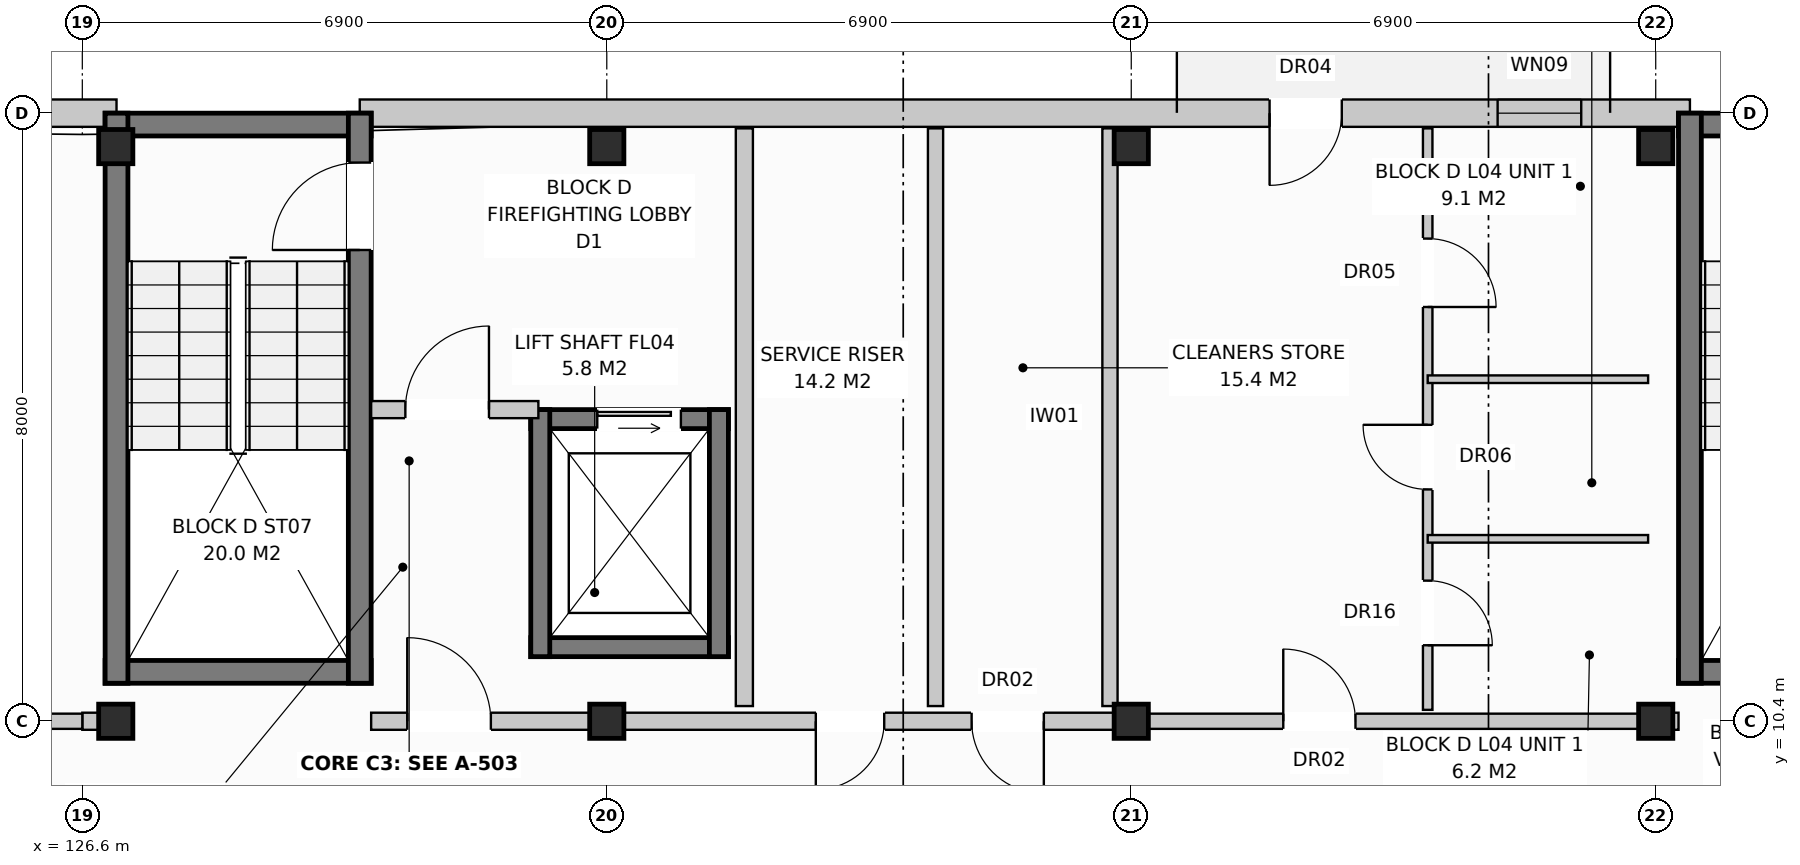
"""IFC4 building model, lengths in metres.
Left out: names, types, materials, properties, quantities, classifications, styles, units other than length and angle.
Written with IfcOpenShell. Run it as: python <this file> out.ifc"""

import sys

from ifc_helpers import new_model, si_unit, direction, frame, frame_2d, origin, origin_with_axes, origin_2d, place, context, subcontext, project, spatial, rectangle, extrude, element, fill, save


model = new_model("IFC4")
c1 = context("Model", 3, precision=1e-05, world=origin(), true_north=direction((0.0, 1.0)))
c2 = subcontext(c1, "Body", "Model", "MODEL_VIEW")
j1 = project(units=[si_unit("LENGTHUNIT", "METRE"), si_unit("PLANEANGLEUNIT", "RADIAN")], contexts=[c1])
p1 = place(None, origin())
s1 = spatial("IfcSite", under=j1, at=p1, CompositionType="ELEMENT")
p2 = place(p1, origin())
s2 = spatial("IfcBuilding", under=s1, at=p2, CompositionType="ELEMENT")
p3 = place(p2, frame((0.0, 0.0, 14.4)))
s3 = spatial("IfcBuildingStorey", under=s2, at=p3, CompositionType="ELEMENT", Elevation=14.4)
for number, where, z_axis, x_axis in (
    (1, (127.04, 10.4, 0.0), (0.0, 0.0, 1.0), (1.0, 0.0, 0.0)),
    (2, (127.04, 17.96, 0.0), (0.0, 0.0, 1.0), (1.0, 0.0, 0.0)),
    (3, (133.5, 10.4, 0.0), (0.0, 0.0, 1.0), (1.0, 0.0, 0.0)),
    (4, (133.5, 17.96, 0.0), (0.0, 0.0, 1.0), (1.0, 0.0, 0.0)),
    (5, (140.4, 10.4, 0.0), (0.0, 0.0, 1.0), (1.0, 0.0, 0.0)),
    (6, (140.4, 17.96, 0.0), (0.0, 0.0, 1.0), (1.0, 0.0, 0.0)),
    (7, (147.3, 10.4, 0.0), (0.0, 0.0, 1.0), (1.0, 0.0, 0.0)),
    (8, (147.3, 17.96, 0.0), (0.0, 0.0, 1.0), (1.0, 0.0, 0.0)),
):
    element("IfcColumn", number, at=place(p3, frame(where, z_axis=z_axis, x_axis=x_axis)), inside=s3, PredefinedType="COLUMN", context=c2, shape_type="SweptSolid", body=[
        extrude(rectangle(XDim=0.45, YDim=0.45, at=origin_2d()), origin(), (0.0, 0.0, 1.0), 3.2),
    ])
p4 = place(p3, frame((112.97, 18.4, 0.0), z_axis=(0.0, 0.0, 1.0), x_axis=(1.0, 0.0, 0.0)))
e9 = element("IfcWall", 9, at=p4, inside=s3, PredefinedType="STANDARD", context=c2, shape_type="SweptSolid", body=[
    extrude(rectangle(XDim=14.08, YDim=0.36, at=frame_2d((7.04, 0.0))), origin(), (0.0, 0.0, 1.0), 2.94),
])
p5 = place(p4, frame((5.127, 0.0, 0.0)))
e10 = element("IfcOpeningElement", 10, at=p5, cuts=e9, PredefinedType="OPENING", context=c2, shape_type="SweptSolid", body=[
    extrude(rectangle(XDim=0.95, YDim=2.1, at=frame_2d((0.475, 1.05))), frame((0.0, 0.192, 0.0), z_axis=(0.0, -1.0, 0.0), x_axis=(1.0, 0.0, 0.0)), (0.0, 0.0, 1.0), 0.384),
])
p6 = place(p4, frame((1.1, 0.0, 0.8)))
e11 = element("IfcOpeningElement", 11, at=p6, cuts=e9, PredefinedType="OPENING", context=c2, shape_type="SweptSolid", body=[
    extrude(rectangle(XDim=1.8, YDim=1.7, at=frame_2d((0.9, 0.85))), frame((0.0, 0.192, 0.0), z_axis=(0.0, -1.0, 0.0), x_axis=(1.0, 0.0, 0.0)), (0.0, 0.0, 1.0), 0.384),
])
p7 = place(p4, frame((10.025, 0.0, 0.8)))
e12 = element("IfcOpeningElement", 12, at=p7, cuts=e9, PredefinedType="OPENING", context=c2, shape_type="SweptSolid", body=[
    extrude(rectangle(XDim=1.95, YDim=1.65, at=frame_2d((0.975, 0.825))), frame((0.0, 0.192, 0.0), z_axis=(0.0, -1.0, 0.0), x_axis=(1.0, 0.0, 0.0)), (0.0, 0.0, 1.0), 0.384),
])
p8 = place(p3, frame((130.25, 18.4, 0.0), z_axis=(0.0, 0.0, 1.0), x_axis=(1.0, 0.0, 0.0)))
e13 = element("IfcWall", 13, at=p8, inside=s3, PredefinedType="STANDARD", context=c2, shape_type="SweptSolid", body=[
    extrude(rectangle(XDim=17.5, YDim=0.36, at=frame_2d((8.75, 0.0))), origin(), (0.0, 0.0, 1.0), 2.94),
])
p9 = place(p8, frame((11.97, 0.0, 0.0)))
e14 = element("IfcOpeningElement", 14, at=p9, cuts=e13, PredefinedType="OPENING", context=c2, shape_type="SweptSolid", body=[
    extrude(rectangle(XDim=0.95, YDim=2.1, at=frame_2d((0.475, 1.05))), frame((0.0, 0.192, 0.0), z_axis=(0.0, -1.0, 0.0), x_axis=(1.0, 0.0, 0.0)), (0.0, 0.0, 1.0), 0.384),
])
p10 = place(p8, frame((14.97, 0.0, 0.72)))
e15 = element("IfcOpeningElement", 15, at=p10, cuts=e13, PredefinedType="OPENING", context=c2, shape_type="SweptSolid", body=[
    extrude(rectangle(XDim=1.1, YDim=1.5, at=frame_2d((0.55, 0.75))), frame((0.0, 0.192, 0.0), z_axis=(0.0, -1.0, 0.0), x_axis=(1.0, 0.0, 0.0)), (0.0, 0.0, 1.0), 0.384),
])
for number, where, z_axis, x_axis in (
    (16, (126.9, 18.25, 0.0), (0.0, 0.0, 1.0), (1.0, 0.0, 0.0)),
    (17, (126.9, 11.05, 0.0), (0.0, 0.0, 1.0), (1.0, 0.0, 0.0)),
):
    element("IfcWall", number, at=place(p3, frame(where, z_axis=z_axis, x_axis=x_axis)), inside=s3, PredefinedType="SHEAR", context=c2, shape_type="SweptSolid", body=[
        extrude(rectangle(XDim=3.5, YDim=0.3, at=frame_2d((1.75, 0.0))), origin(), (0.0, 0.0, 1.0), 2.94),
    ])
p11 = place(p3, frame((127.05, 10.9, 0.0), z_axis=(0.0, 0.0, 1.0), x_axis=(0.0, 1.0, 0.0)))
e18 = element("IfcWall", 18, at=p11, inside=s3, PredefinedType="SHEAR", context=c2, shape_type="SweptSolid", body=[
    extrude(rectangle(XDim=7.5, YDim=0.3, at=frame_2d((3.75, 0.0))), origin(), (0.0, 0.0, 1.0), 2.94),
])
p12 = place(p3, frame((130.25, 10.9, 0.0), z_axis=(0.0, 0.0, 1.0), x_axis=(0.0, 1.0, 0.0)))
e19 = element("IfcWall", 19, at=p12, inside=s3, PredefinedType="SHEAR", context=c2, shape_type="SweptSolid", body=[
    extrude(rectangle(XDim=7.5, YDim=0.3, at=frame_2d((3.75, 0.0))), origin(), (0.0, 0.0, 1.0), 2.94),
])
p13 = place(p12, frame((5.7, 0.0, 0.0)))
e20 = element("IfcOpeningElement", 20, at=p13, cuts=e19, PredefinedType="OPENING", context=c2, shape_type="SweptSolid", body=[
    extrude(rectangle(XDim=1.15, YDim=2.15, at=frame_2d((0.575, 1.075))), frame((0.0, 0.162, 0.0), z_axis=(0.0, -1.0, 0.0), x_axis=(1.0, 0.0, 0.0)), (0.0, 0.0, 1.0), 0.324),
])
p14 = place(p3, frame((132.5, 14.375, 0.0), z_axis=(0.0, 0.0, 1.0), x_axis=(1.0, 0.0, 0.0)))
e21 = element("IfcWall", 21, at=p14, inside=s3, PredefinedType="SHEAR", context=c2, shape_type="SweptSolid", body=[
    extrude(rectangle(XDim=2.6, YDim=0.25, at=frame_2d((1.3, 0.0))), origin(), (0.0, 0.0, 1.0), 2.94),
])
p15 = place(p14, frame((0.875, 0.0, 0.0)))
e22 = element("IfcOpeningElement", 22, at=p15, cuts=e21, PredefinedType="OPENING", context=c2, shape_type="SweptSolid", body=[
    extrude(rectangle(XDim=1.1, YDim=2.1, at=frame_2d((0.55, 1.05))), frame((0.0, 0.137, 0.0), z_axis=(0.0, -1.0, 0.0), x_axis=(1.0, 0.0, 0.0)), (0.0, 0.0, 1.0), 0.274),
])
p16 = place(p3, frame((132.5, 11.375, 0.0), z_axis=(0.0, 0.0, 1.0), x_axis=(1.0, 0.0, 0.0)))
e23 = element("IfcWall", 23, at=p16, inside=s3, PredefinedType="SHEAR", context=c2, shape_type="SweptSolid", body=[
    extrude(rectangle(XDim=2.6, YDim=0.25, at=frame_2d((1.3, 0.0))), origin(), (0.0, 0.0, 1.0), 2.94),
])
for number, where, z_axis, x_axis in (
    (24, (132.625, 11.25, 0.0), (0.0, 0.0, 1.0), (0.0, 1.0, 0.0)),
    (25, (134.975, 11.25, 0.0), (0.0, 0.0, 1.0), (0.0, 1.0, 0.0)),
):
    element("IfcWall", number, at=place(p3, frame(where, z_axis=z_axis, x_axis=x_axis)), inside=s3, PredefinedType="SHEAR", context=c2, shape_type="SweptSolid", body=[
        extrude(rectangle(XDim=3.25, YDim=0.25, at=frame_2d((1.625, 0.0))), origin(), (0.0, 0.0, 1.0), 2.94),
    ])
p17 = place(p3, frame((135.31, 10.6, 0.0), z_axis=(0.0, 0.0, 1.0), x_axis=(0.0, 1.0, 0.0)))
e26 = element("IfcWall", 26, at=p17, inside=s3, PredefinedType="PARTITIONING", context=c2, shape_type="SweptSolid", body=[
    extrude(rectangle(XDim=7.6, YDim=0.225, at=frame_2d((3.8, 0.0))), origin(), (0.0, 0.0, 1.0), 2.59),
])
p18 = place(p3, frame((130.4, 14.5, 0.0), z_axis=(0.0, 0.0, 1.0), x_axis=(1.0, 0.0, 0.0)))
e27 = element("IfcWall", 27, at=p18, inside=s3, PredefinedType="PARTITIONING", context=c2, shape_type="SweptSolid", body=[
    extrude(rectangle(XDim=2.2, YDim=0.225, at=frame_2d((1.1, 0.0))), origin(), (0.0, 0.0, 1.0), 2.94),
])
p19 = place(p18, frame((0.45, 0.0, 0.0)))
e28 = element("IfcOpeningElement", 28, at=p19, cuts=e27, PredefinedType="OPENING", context=c2, shape_type="SweptSolid", body=[
    extrude(rectangle(XDim=1.1, YDim=2.15, at=frame_2d((0.55, 1.075))), frame((0.0, 0.125, 0.0), z_axis=(0.0, -1.0, 0.0), x_axis=(1.0, 0.0, 0.0)), (0.0, 0.0, 1.0), 0.249),
])
p20 = place(p3, frame((126.6, 10.4, 0.0), z_axis=(0.0, 0.0, 1.0), x_axis=(1.0, 0.0, 0.0)))
e29 = element("IfcWall", 29, at=p20, inside=s3, PredefinedType="PARTITIONING", context=c2, shape_type="SweptSolid", body=[
    extrude(rectangle(XDim=0.3, YDim=0.225, at=frame_2d((0.15, 0.0))), origin(), (0.0, 0.0, 1.0), 2.94),
])
for number, where, z_axis, x_axis in (
    (30, (137.825, 10.6, 0.0), (0.0, 0.0, 1.0), (0.0, 1.0, 0.0)),
    (31, (140.12, 10.6, 0.0), (0.0, 0.0, 1.0), (0.0, 1.0, 0.0)),
):
    element("IfcWall", number, at=place(p3, frame(where, z_axis=z_axis, x_axis=x_axis)), inside=s3, PredefinedType="PARTITIONING", context=c2, shape_type="SweptSolid", body=[
        extrude(rectangle(XDim=7.6, YDim=0.2, at=frame_2d((3.8, 0.0))), origin(), (0.0, 0.0, 1.0), 2.94),
    ])
p21 = place(p3, frame((130.4, 10.4, 0.0), z_axis=(0.0, 0.0, 1.0), x_axis=(1.0, 0.0, 0.0)))
e32 = element("IfcWall", 32, at=p21, inside=s3, PredefinedType="PARTITIONING", context=c2, shape_type="SweptSolid", body=[
    extrude(rectangle(XDim=10.0, YDim=0.225, at=frame_2d((5.0, 0.0))), origin(), (0.0, 0.0, 1.0), 2.38),
])
p22 = place(p21, frame((0.475, 0.0, 0.0)))
e33 = element("IfcOpeningElement", 33, at=p22, cuts=e32, PredefinedType="OPENING", context=c2, shape_type="SweptSolid", body=[
    extrude(rectangle(XDim=1.1, YDim=2.15, at=frame_2d((0.55, 1.075))), frame((0.0, 0.125, 0.0), z_axis=(0.0, -1.0, 0.0), x_axis=(1.0, 0.0, 0.0)), (0.0, 0.0, 1.0), 0.249),
])
p23 = place(p21, frame((5.85, 0.0, 0.0)))
e34 = element("IfcOpeningElement", 34, at=p23, cuts=e32, PredefinedType="OPENING", context=c2, shape_type="SweptSolid", body=[
    extrude(rectangle(XDim=0.9, YDim=2.1, at=frame_2d((0.45, 1.05))), frame((0.0, 0.125, 0.0), z_axis=(0.0, -1.0, 0.0), x_axis=(1.0, 0.0, 0.0)), (0.0, 0.0, 1.0), 0.249),
])
p24 = place(p21, frame((7.9, 0.0, 0.0)))
e35 = element("IfcOpeningElement", 35, at=p24, cuts=e32, PredefinedType="OPENING", context=c2, shape_type="SweptSolid", body=[
    extrude(rectangle(XDim=0.95, YDim=2.15, at=frame_2d((0.475, 1.075))), frame((0.0, 0.125, 0.0), z_axis=(0.0, -1.0, 0.0), x_axis=(1.0, 0.0, 0.0)), (0.0, 0.0, 1.0), 0.249),
])
for number, where, z_axis, x_axis in (
    (36, (147.6, 18.25, 0.0), (0.0, 0.0, 1.0), (1.0, 0.0, 0.0)),
    (37, (147.6, 11.05, 0.0), (0.0, 0.0, 1.0), (1.0, 0.0, 0.0)),
):
    element("IfcWall", number, at=place(p3, frame(where, z_axis=z_axis, x_axis=x_axis)), inside=s3, PredefinedType="SHEAR", context=c2, shape_type="SweptSolid", body=[
        extrude(rectangle(XDim=3.5, YDim=0.3, at=frame_2d((1.75, 0.0))), origin(), (0.0, 0.0, 1.0), 2.94),
    ])
p25 = place(p3, frame((147.75, 10.9, 0.0), z_axis=(0.0, 0.0, 1.0), x_axis=(0.0, 1.0, 0.0)))
e38 = element("IfcWall", 38, at=p25, inside=s3, PredefinedType="SHEAR", context=c2, shape_type="SweptSolid", body=[
    extrude(rectangle(XDim=7.5, YDim=0.3, at=frame_2d((3.75, 0.0))), origin(), (0.0, 0.0, 1.0), 2.94),
])
p26 = place(p3, frame((147.3, 10.4, 0.0), z_axis=(0.0, 0.0, 1.0), x_axis=(1.0, 0.0, 0.0)))
e39 = element("IfcWall", 39, at=p26, inside=s3, PredefinedType="PARTITIONING", context=c2, shape_type="SweptSolid", body=[
    extrude(rectangle(XDim=0.3, YDim=0.225, at=frame_2d((0.15, 0.0))), origin(), (0.0, 0.0, 1.0), 2.94),
])
p27 = place(p3, frame((112.8, 10.4, 0.0), z_axis=(0.0, 0.0, 1.0), x_axis=(1.0, 0.0, 0.0)))
e40 = element("IfcWall", 40, at=p27, inside=s3, PredefinedType="PARTITIONING", context=c2, shape_type="SweptSolid", body=[
    extrude(rectangle(XDim=13.8, YDim=0.2, at=frame_2d((6.9, 0.0))), origin(), (0.0, 0.0, 1.0), 2.38),
])
p28 = place(p27, frame((9.6, 0.0, 0.0)))
e41 = element("IfcOpeningElement", 41, at=p28, cuts=e40, PredefinedType="OPENING", context=c2, shape_type="SweptSolid", body=[
    extrude(rectangle(XDim=0.95, YDim=2.15, at=frame_2d((0.475, 1.075))), frame((0.0, 0.112, 0.0), z_axis=(0.0, -1.0, 0.0), x_axis=(1.0, 0.0, 0.0)), (0.0, 0.0, 1.0), 0.224),
])
p29 = place(p3, frame((140.4, 10.4, 0.0), z_axis=(0.0, 0.0, 1.0), x_axis=(1.0, 0.0, 0.0)))
e42 = element("IfcWall", 42, at=p29, inside=s3, PredefinedType="PARTITIONING", context=c2, shape_type="SweptSolid", body=[
    extrude(rectangle(XDim=6.9, YDim=0.2, at=frame_2d((3.45, 0.0))), origin(), (0.0, 0.0, 1.0), 2.38),
])
p30 = place(p29, frame((2.0, 0.0, 0.0)))
e43 = element("IfcOpeningElement", 43, at=p30, cuts=e42, PredefinedType="OPENING", context=c2, shape_type="SweptSolid", body=[
    extrude(rectangle(XDim=0.95, YDim=2.15, at=frame_2d((0.475, 1.075))), frame((0.0, 0.112, 0.0), z_axis=(0.0, -1.0, 0.0), x_axis=(1.0, 0.0, 0.0)), (0.0, 0.0, 1.0), 0.224),
])
p31 = place(p3, frame((144.3, 10.55, 0.0), z_axis=(0.0, 0.0, 1.0), x_axis=(0.0, 1.0, 0.0)))
e44 = element("IfcWall", 44, at=p31, inside=s3, PredefinedType="PARTITIONING", context=c2, shape_type="SweptSolid", body=[
    extrude(rectangle(XDim=7.65, YDim=0.125, at=frame_2d((3.825, 0.0))), origin(), (0.0, 0.0, 1.0), 2.94),
])
p32 = place(p31, frame((0.85, 0.0, 0.0)))
e45 = element("IfcOpeningElement", 45, at=p32, cuts=e44, PredefinedType="OPENING", context=c2, shape_type="SweptSolid", body=[
    extrude(rectangle(XDim=0.85, YDim=2.1, at=frame_2d((0.425, 1.05))), frame((0.0, 0.074, 0.0), z_axis=(0.0, -1.0, 0.0), x_axis=(1.0, 0.0, 0.0)), (0.0, 0.0, 1.0), 0.149),
])
p33 = place(p31, frame((2.9, 0.0, 0.0)))
e46 = element("IfcOpeningElement", 46, at=p33, cuts=e44, PredefinedType="OPENING", context=c2, shape_type="SweptSolid", body=[
    extrude(rectangle(XDim=0.85, YDim=2.05, at=frame_2d((0.425, 1.025))), frame((0.0, 0.074, 0.0), z_axis=(0.0, -1.0, 0.0), x_axis=(1.0, 0.0, 0.0)), (0.0, 0.0, 1.0), 0.149),
])
p34 = place(p31, frame((5.3, 0.0, 0.0)))
e47 = element("IfcOpeningElement", 47, at=p34, cuts=e44, PredefinedType="OPENING", context=c2, shape_type="SweptSolid", body=[
    extrude(rectangle(XDim=0.9, YDim=2.1, at=frame_2d((0.45, 1.05))), frame((0.0, 0.074, 0.0), z_axis=(0.0, -1.0, 0.0), x_axis=(1.0, 0.0, 0.0)), (0.0, 0.0, 1.0), 0.149),
])
for number, where, z_axis, x_axis in (
    (48, (144.3, 12.8, 0.0), (0.0, 0.0, 1.0), (1.0, 0.0, 0.0)),
    (49, (144.3, 14.9, 0.0), (0.0, 0.0, 1.0), (1.0, 0.0, 0.0)),
):
    element("IfcWall", number, at=place(p3, frame(where, z_axis=z_axis, x_axis=x_axis)), inside=s3, PredefinedType="PARTITIONING", context=c2, shape_type="SweptSolid", body=[
        extrude(rectangle(XDim=2.9, YDim=0.1, at=frame_2d((1.45, 0.0))), origin(), (0.0, 0.0, 1.0), 2.94),
    ])
p35 = place(p9, frame((0.95, 0.0, 0.0), z_axis=(0.0, 0.0, 1.0), x_axis=(-1.0, 0.0, 0.0)))
e50 = element("IfcDoor", 50, at=p35, inside=s3, OperationType="SINGLE_SWING_LEFT", PredefinedType="DOOR", context=c2, shape_type="SweptSolid", body=[
    extrude(rectangle(XDim=0.95, YDim=2.1, at=frame_2d((0.475, 1.05))), frame((0.0, 0.025, 0.0), z_axis=(0.0, -1.0, 0.0), x_axis=(1.0, 0.0, 0.0)), (0.0, 0.0, 1.0), 0.05),
])
fill(e14, e50)
p36 = place(p10, origin_with_axes())
e51 = element("IfcWindow", 51, at=p36, inside=s3, PartitioningType="SINGLE_PANEL", PredefinedType="WINDOW", context=c2, shape_type="SweptSolid", body=[
    extrude(rectangle(XDim=1.1, YDim=1.5, at=frame_2d((0.55, 0.75))), frame((0.0, 0.03, 0.0), z_axis=(0.0, -1.0, 0.0), x_axis=(1.0, 0.0, 0.0)), (0.0, 0.0, 1.0), 0.06),
])
fill(e15, e51)
p37 = place(p13, origin_with_axes())
e52 = element("IfcDoor", 52, at=p37, inside=s3, OperationType="SINGLE_SWING_LEFT", PredefinedType="DOOR", context=c2, shape_type="SweptSolid", body=[
    extrude(rectangle(XDim=1.15, YDim=2.15, at=frame_2d((0.575, 1.075))), frame((0.0, 0.025, 0.0), z_axis=(0.0, -1.0, 0.0), x_axis=(1.0, 0.0, 0.0)), (0.0, 0.0, 1.0), 0.05),
])
fill(e20, e52)
p38 = place(p15, origin_with_axes())
e53 = element("IfcDoor", 53, at=p38, inside=s3, OperationType="SLIDING_TO_LEFT", PredefinedType="DOOR", context=c2, shape_type="SweptSolid", body=[
    extrude(rectangle(XDim=1.1, YDim=2.1, at=frame_2d((0.55, 1.05))), frame((0.0, 0.025, 0.0), z_axis=(0.0, -1.0, 0.0), x_axis=(1.0, 0.0, 0.0)), (0.0, 0.0, 1.0), 0.05),
])
fill(e22, e53)
p39 = place(p19, origin_with_axes())
e54 = element("IfcDoor", 54, at=p39, inside=s3, OperationType="SINGLE_SWING_RIGHT", PredefinedType="DOOR", context=c2, shape_type="SweptSolid", body=[
    extrude(rectangle(XDim=1.1, YDim=2.15, at=frame_2d((0.55, 1.075))), frame((0.0, 0.025, 0.0), z_axis=(0.0, -1.0, 0.0), x_axis=(1.0, 0.0, 0.0)), (0.0, 0.0, 1.0), 0.05),
])
fill(e28, e54)
p40 = place(p22, origin_with_axes())
e55 = element("IfcDoor", 55, at=p40, inside=s3, OperationType="SINGLE_SWING_LEFT", PredefinedType="DOOR", context=c2, shape_type="SweptSolid", body=[
    extrude(rectangle(XDim=1.1, YDim=2.15, at=frame_2d((0.55, 1.075))), frame((0.0, 0.025, 0.0), z_axis=(0.0, -1.0, 0.0), x_axis=(1.0, 0.0, 0.0)), (0.0, 0.0, 1.0), 0.05),
])
fill(e33, e55)
p41 = place(p23, frame((0.9, 0.0, 0.0), z_axis=(0.0, 0.0, 1.0), x_axis=(-1.0, 0.0, 0.0)))
e56 = element("IfcDoor", 56, at=p41, inside=s3, OperationType="SINGLE_SWING_LEFT", PredefinedType="DOOR", context=c2, shape_type="SweptSolid", body=[
    extrude(rectangle(XDim=0.9, YDim=2.1, at=frame_2d((0.45, 1.05))), frame((0.0, 0.025, 0.0), z_axis=(0.0, -1.0, 0.0), x_axis=(1.0, 0.0, 0.0)), (0.0, 0.0, 1.0), 0.05),
])
fill(e34, e56)
p42 = place(p24, frame((0.95, 0.0, 0.0), z_axis=(0.0, 0.0, 1.0), x_axis=(-1.0, 0.0, 0.0)))
e57 = element("IfcDoor", 57, at=p42, inside=s3, OperationType="SINGLE_SWING_RIGHT", PredefinedType="DOOR", context=c2, shape_type="SweptSolid", body=[
    extrude(rectangle(XDim=0.95, YDim=2.15, at=frame_2d((0.475, 1.075))), frame((0.0, 0.025, 0.0), z_axis=(0.0, -1.0, 0.0), x_axis=(1.0, 0.0, 0.0)), (0.0, 0.0, 1.0), 0.05),
])
fill(e35, e57)
p43 = place(p30, origin_with_axes())
e58 = element("IfcDoor", 58, at=p43, inside=s3, OperationType="SINGLE_SWING_LEFT", PredefinedType="DOOR", context=c2, shape_type="SweptSolid", body=[
    extrude(rectangle(XDim=0.95, YDim=2.15, at=frame_2d((0.475, 1.075))), frame((0.0, 0.025, 0.0), z_axis=(0.0, -1.0, 0.0), x_axis=(1.0, 0.0, 0.0)), (0.0, 0.0, 1.0), 0.05),
])
fill(e43, e58)
p44 = place(p32, frame((0.85, 0.0, 0.0), z_axis=(0.0, 0.0, 1.0), x_axis=(-1.0, 0.0, 0.0)))
e59 = element("IfcDoor", 59, at=p44, inside=s3, OperationType="SINGLE_SWING_LEFT", PredefinedType="DOOR", context=c2, shape_type="SweptSolid", body=[
    extrude(rectangle(XDim=0.85, YDim=2.1, at=frame_2d((0.425, 1.05))), frame((0.0, 0.025, 0.0), z_axis=(0.0, -1.0, 0.0), x_axis=(1.0, 0.0, 0.0)), (0.0, 0.0, 1.0), 0.05),
])
fill(e45, e59)
p45 = place(p33, origin_with_axes())
e60 = element("IfcDoor", 60, at=p45, inside=s3, OperationType="SINGLE_SWING_RIGHT", PredefinedType="DOOR", context=c2, shape_type="SweptSolid", body=[
    extrude(rectangle(XDim=0.85, YDim=2.05, at=frame_2d((0.425, 1.025))), frame((0.0, 0.025, 0.0), z_axis=(0.0, -1.0, 0.0), x_axis=(1.0, 0.0, 0.0)), (0.0, 0.0, 1.0), 0.05),
])
fill(e46, e60)
p46 = place(p34, frame((0.9, 0.0, 0.0), z_axis=(0.0, 0.0, 1.0), x_axis=(-1.0, 0.0, 0.0)))
e61 = element("IfcDoor", 61, at=p46, inside=s3, OperationType="SINGLE_SWING_LEFT", PredefinedType="DOOR", context=c2, shape_type="SweptSolid", body=[
    extrude(rectangle(XDim=0.9, YDim=2.1, at=frame_2d((0.45, 1.05))), frame((0.0, 0.025, 0.0), z_axis=(0.0, -1.0, 0.0), x_axis=(1.0, 0.0, 0.0)), (0.0, 0.0, 1.0), 0.05),
])
fill(e47, e61)
save(model, sys.argv[1])
